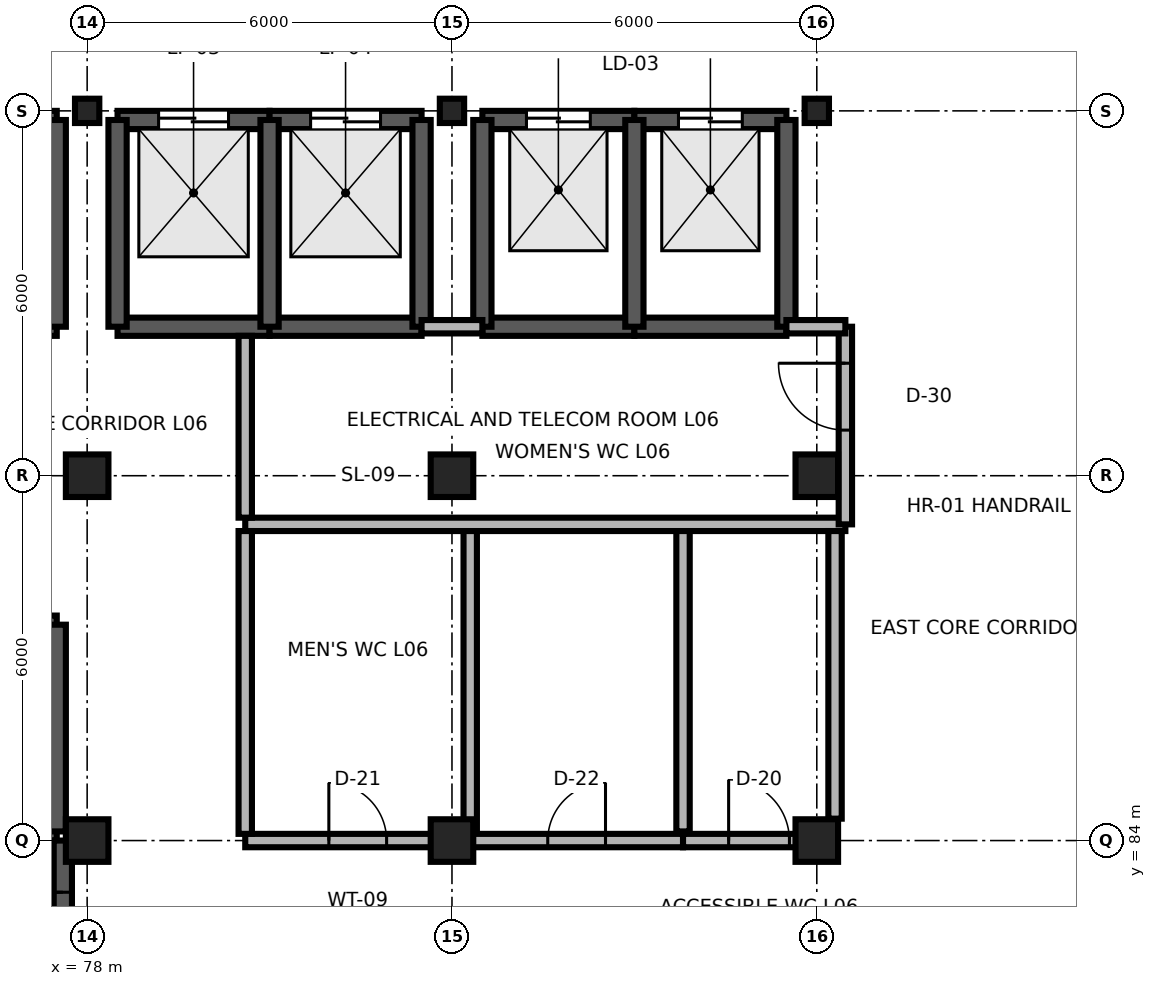
"""IFC4 building model, lengths in metres.
Left out: names, types, materials, properties, quantities, classifications, styles, units other than length and angle.
Written with IfcOpenShell. Run it as: python <this file> out.ifc"""

import sys

from ifc_helpers import new_model, si_unit, direction, frame, frame_2d, origin, origin_2d, place, context, subcontext, project, spatial, rectangle, i_section, extrude, element, fill, save


model = new_model("IFC4")
c1 = context("Model", 3, precision=1e-05, world=origin(), true_north=direction((0.0, 1.0)))
c2 = subcontext(c1, "Body", "Model", "MODEL_VIEW")
j1 = project(units=[si_unit("LENGTHUNIT", "METRE"), si_unit("PLANEANGLEUNIT", "RADIAN")], contexts=[c1])
p1 = place(None, origin())
s1 = spatial("IfcSite", under=j1, at=p1, CompositionType="ELEMENT")
p2 = place(p1, origin())
s2 = spatial("IfcBuilding", under=s1, at=p2, CompositionType="ELEMENT")
p3 = place(p2, frame((0.0, 0.0, 24.9)))
s3 = spatial("IfcBuildingStorey", under=s2, at=p3, CompositionType="ELEMENT", Elevation=24.9)
for number, where, z_axis, x_axis in (
    (1, (78.0, 84.0, 0.0), (0.0, 0.0, 1.0), (1.0, 0.0, 0.0)),
    (2, (84.0, 84.0, 0.0), (0.0, 0.0, 1.0), (1.0, 0.0, 0.0)),
    (3, (90.0, 84.0, 0.0), (0.0, 0.0, 1.0), (1.0, 0.0, 0.0)),
    (4, (78.0, 90.0, 0.0), (0.0, 0.0, 1.0), (1.0, 0.0, 0.0)),
    (5, (84.0, 90.0, 0.0), (0.0, 0.0, 1.0), (1.0, 0.0, 0.0)),
    (6, (90.0, 90.0, 0.0), (0.0, 0.0, 1.0), (1.0, 0.0, 0.0)),
):
    element("IfcColumn", number, at=place(p3, frame(where, z_axis=z_axis, x_axis=x_axis)), inside=s3, PredefinedType="COLUMN", context=c2, shape_type="SweptSolid", body=[
        extrude(rectangle(XDim=0.7, YDim=0.7, at=origin_2d()), origin(), (0.0, 0.0, 1.0), 3.9),
    ])
for number, where, z_axis, x_axis in (
    (7, (78.0, 96.0, 0.0), (0.0, 0.0, 1.0), (1.0, 0.0, 0.0)),
    (8, (84.0, 96.0, 0.0), (0.0, 0.0, 1.0), (1.0, 0.0, 0.0)),
    (9, (90.0, 96.0, 0.0), (0.0, 0.0, 1.0), (1.0, 0.0, 0.0)),
):
    element("IfcColumn", number, at=place(p3, frame(where, z_axis=z_axis, x_axis=x_axis)), inside=s3, PredefinedType="COLUMN", context=c2, shape_type="SweptSolid", body=[
        extrude(i_section(OverallWidth=0.4, OverallDepth=0.4, WebThickness=0.013, FlangeThickness=0.021, FilletRadius=0.022, at=origin_2d()), origin(), (0.0, 0.0, 1.0), 3.9),
    ])
p4 = place(p3, frame((75.0, 84.15, 0.0), z_axis=(0.0, 0.0, 1.0), x_axis=(1.0, 0.0, 0.0)))
e10 = element("IfcWall", 10, at=p4, inside=s3, PredefinedType="SHEAR", context=c2, shape_type="SweptSolid", body=[
    extrude(rectangle(XDim=2.5, YDim=0.3, at=frame_2d((1.25, 0.0))), origin(), (0.0, 0.0, 1.0), 3.74),
])
p5 = place(p4, frame((0.7, 0.0, 0.0)))
e11 = element("IfcOpeningElement", 11, at=p5, cuts=e10, PredefinedType="OPENING", context=c2, shape_type="SweptSolid", body=[
    extrude(rectangle(XDim=1.1, YDim=2.1, at=frame_2d((0.55, 1.05))), frame((0.0, 0.165, 0.0), z_axis=(0.0, -1.0, 0.0), x_axis=(1.0, 0.0, 0.0)), (0.0, 0.0, 1.0), 0.33),
])
p6 = place(p3, frame((75.0, 87.55, 0.0), z_axis=(0.0, 0.0, 1.0), x_axis=(1.0, 0.0, 0.0)))
e12 = element("IfcWall", 12, at=p6, inside=s3, PredefinedType="SHEAR", context=c2, shape_type="SweptSolid", body=[
    extrude(rectangle(XDim=2.5, YDim=0.3, at=frame_2d((1.25, 0.0))), origin(), (0.0, 0.0, 1.0), 3.74),
])
p7 = place(p3, frame((77.5, 84.15, 0.0), z_axis=(0.0, 0.0, 1.0), x_axis=(0.0, 1.0, 0.0)))
e13 = element("IfcWall", 13, at=p7, inside=s3, PredefinedType="SHEAR", context=c2, shape_type="SweptSolid", body=[
    extrude(rectangle(XDim=3.4, YDim=0.3, at=frame_2d((1.7, 0.0))), origin(), (0.0, 0.0, 1.0), 3.74),
])
p8 = place(p3, frame((75.0, 95.85, 0.0), z_axis=(0.0, 0.0, 1.0), x_axis=(1.0, 0.0, 0.0)))
e14 = element("IfcWall", 14, at=p8, inside=s3, PredefinedType="SHEAR", context=c2, shape_type="SweptSolid", body=[
    extrude(rectangle(XDim=2.5, YDim=0.3, at=frame_2d((1.25, 0.0))), origin(), (0.0, 0.0, 1.0), 3.74),
])
p9 = place(p8, frame((0.675, 0.0, 0.0)))
e15 = element("IfcOpeningElement", 15, at=p9, cuts=e14, PredefinedType="OPENING", context=c2, shape_type="SweptSolid", body=[
    extrude(rectangle(XDim=1.15, YDim=2.15, at=frame_2d((0.575, 1.075))), frame((0.0, 0.165, 0.0), z_axis=(0.0, -1.0, 0.0), x_axis=(1.0, 0.0, 0.0)), (0.0, 0.0, 1.0), 0.33),
])
p10 = place(p3, frame((75.0, 92.45, 0.0), z_axis=(0.0, 0.0, 1.0), x_axis=(1.0, 0.0, 0.0)))
e16 = element("IfcWall", 16, at=p10, inside=s3, PredefinedType="SHEAR", context=c2, shape_type="SweptSolid", body=[
    extrude(rectangle(XDim=2.5, YDim=0.3, at=frame_2d((1.25, 0.0))), origin(), (0.0, 0.0, 1.0), 3.74),
])
p11 = place(p3, frame((77.5, 92.45, 0.0), z_axis=(0.0, 0.0, 1.0), x_axis=(0.0, 1.0, 0.0)))
e17 = element("IfcWall", 17, at=p11, inside=s3, PredefinedType="SHEAR", context=c2, shape_type="SweptSolid", body=[
    extrude(rectangle(XDim=3.4, YDim=0.3, at=frame_2d((1.7, 0.0))), origin(), (0.0, 0.0, 1.0), 3.74),
])
p12 = place(p3, frame((78.5, 95.85, 0.0), z_axis=(0.0, 0.0, 1.0), x_axis=(1.0, 0.0, 0.0)))
e18 = element("IfcWall", 18, at=p12, inside=s3, PredefinedType="SHEAR", context=c2, shape_type="SweptSolid", body=[
    extrude(rectangle(XDim=2.5, YDim=0.3, at=frame_2d((1.25, 0.0))), origin(), (0.0, 0.0, 1.0), 3.74),
])
p13 = place(p12, frame((0.675, 0.0, 0.0)))
e19 = element("IfcOpeningElement", 19, at=p13, cuts=e18, PredefinedType="OPENING", context=c2, shape_type="SweptSolid", body=[
    extrude(rectangle(XDim=1.15, YDim=2.15, at=frame_2d((0.575, 1.075))), frame((0.0, 0.165, 0.0), z_axis=(0.0, -1.0, 0.0), x_axis=(1.0, 0.0, 0.0)), (0.0, 0.0, 1.0), 0.33),
])
p14 = place(p3, frame((78.5, 92.45, 0.0), z_axis=(0.0, 0.0, 1.0), x_axis=(1.0, 0.0, 0.0)))
e20 = element("IfcWall", 20, at=p14, inside=s3, PredefinedType="SHEAR", context=c2, shape_type="SweptSolid", body=[
    extrude(rectangle(XDim=2.5, YDim=0.3, at=frame_2d((1.25, 0.0))), origin(), (0.0, 0.0, 1.0), 3.74),
])
p15 = place(p3, frame((78.5, 92.45, 0.0), z_axis=(0.0, 0.0, 1.0), x_axis=(0.0, 1.0, 0.0)))
e21 = element("IfcWall", 21, at=p15, inside=s3, PredefinedType="SHEAR", context=c2, shape_type="SweptSolid", body=[
    extrude(rectangle(XDim=3.4, YDim=0.3, at=frame_2d((1.7, 0.0))), origin(), (0.0, 0.0, 1.0), 3.74),
])
p16 = place(p3, frame((81.0, 95.85, 0.0), z_axis=(0.0, 0.0, 1.0), x_axis=(1.0, 0.0, 0.0)))
e22 = element("IfcWall", 22, at=p16, inside=s3, PredefinedType="SHEAR", context=c2, shape_type="SweptSolid", body=[
    extrude(rectangle(XDim=2.5, YDim=0.3, at=frame_2d((1.25, 0.0))), origin(), (0.0, 0.0, 1.0), 3.74),
])
p17 = place(p16, frame((0.675, 0.0, 0.0)))
e23 = element("IfcOpeningElement", 23, at=p17, cuts=e22, PredefinedType="OPENING", context=c2, shape_type="SweptSolid", body=[
    extrude(rectangle(XDim=1.15, YDim=2.15, at=frame_2d((0.575, 1.075))), frame((0.0, 0.165, 0.0), z_axis=(0.0, -1.0, 0.0), x_axis=(1.0, 0.0, 0.0)), (0.0, 0.0, 1.0), 0.33),
])
p18 = place(p3, frame((81.0, 92.45, 0.0), z_axis=(0.0, 0.0, 1.0), x_axis=(1.0, 0.0, 0.0)))
e24 = element("IfcWall", 24, at=p18, inside=s3, PredefinedType="SHEAR", context=c2, shape_type="SweptSolid", body=[
    extrude(rectangle(XDim=2.5, YDim=0.3, at=frame_2d((1.25, 0.0))), origin(), (0.0, 0.0, 1.0), 3.74),
])
for number, where, z_axis, x_axis in (
    (25, (81.0, 92.45, 0.0), (0.0, 0.0, 1.0), (0.0, 1.0, 0.0)),
    (26, (83.5, 92.45, 0.0), (0.0, 0.0, 1.0), (0.0, 1.0, 0.0)),
):
    element("IfcWall", number, at=place(p3, frame(where, z_axis=z_axis, x_axis=x_axis)), inside=s3, PredefinedType="SHEAR", context=c2, shape_type="SweptSolid", body=[
        extrude(rectangle(XDim=3.4, YDim=0.3, at=frame_2d((1.7, 0.0))), origin(), (0.0, 0.0, 1.0), 3.74),
    ])
p19 = place(p3, frame((84.5, 95.85, 0.0), z_axis=(0.0, 0.0, 1.0), x_axis=(1.0, 0.0, 0.0)))
e27 = element("IfcWall", 27, at=p19, inside=s3, PredefinedType="SHEAR", context=c2, shape_type="SweptSolid", body=[
    extrude(rectangle(XDim=2.5, YDim=0.3, at=frame_2d((1.25, 0.0))), origin(), (0.0, 0.0, 1.0), 3.74),
])
p20 = place(p19, frame((0.725, 0.0, 0.0)))
e28 = element("IfcOpeningElement", 28, at=p20, cuts=e27, PredefinedType="OPENING", context=c2, shape_type="SweptSolid", body=[
    extrude(rectangle(XDim=1.05, YDim=2.1, at=frame_2d((0.525, 1.05))), frame((0.0, 0.165, 0.0), z_axis=(0.0, -1.0, 0.0), x_axis=(1.0, 0.0, 0.0)), (0.0, 0.0, 1.0), 0.33),
])
p21 = place(p3, frame((84.5, 92.45, 0.0), z_axis=(0.0, 0.0, 1.0), x_axis=(1.0, 0.0, 0.0)))
e29 = element("IfcWall", 29, at=p21, inside=s3, PredefinedType="SHEAR", context=c2, shape_type="SweptSolid", body=[
    extrude(rectangle(XDim=2.5, YDim=0.3, at=frame_2d((1.25, 0.0))), origin(), (0.0, 0.0, 1.0), 3.74),
])
p22 = place(p3, frame((84.5, 92.45, 0.0), z_axis=(0.0, 0.0, 1.0), x_axis=(0.0, 1.0, 0.0)))
e30 = element("IfcWall", 30, at=p22, inside=s3, PredefinedType="SHEAR", context=c2, shape_type="SweptSolid", body=[
    extrude(rectangle(XDim=3.4, YDim=0.3, at=frame_2d((1.7, 0.0))), origin(), (0.0, 0.0, 1.0), 3.74),
])
p23 = place(p3, frame((87.0, 95.85, 0.0), z_axis=(0.0, 0.0, 1.0), x_axis=(1.0, 0.0, 0.0)))
e31 = element("IfcWall", 31, at=p23, inside=s3, PredefinedType="SHEAR", context=c2, shape_type="SweptSolid", body=[
    extrude(rectangle(XDim=2.5, YDim=0.3, at=frame_2d((1.25, 0.0))), origin(), (0.0, 0.0, 1.0), 3.74),
])
p24 = place(p23, frame((0.725, 0.0, 0.0)))
e32 = element("IfcOpeningElement", 32, at=p24, cuts=e31, PredefinedType="OPENING", context=c2, shape_type="SweptSolid", body=[
    extrude(rectangle(XDim=1.05, YDim=2.1, at=frame_2d((0.525, 1.05))), frame((0.0, 0.165, 0.0), z_axis=(0.0, -1.0, 0.0), x_axis=(1.0, 0.0, 0.0)), (0.0, 0.0, 1.0), 0.33),
])
p25 = place(p3, frame((87.0, 92.45, 0.0), z_axis=(0.0, 0.0, 1.0), x_axis=(1.0, 0.0, 0.0)))
e33 = element("IfcWall", 33, at=p25, inside=s3, PredefinedType="SHEAR", context=c2, shape_type="SweptSolid", body=[
    extrude(rectangle(XDim=2.5, YDim=0.3, at=frame_2d((1.25, 0.0))), origin(), (0.0, 0.0, 1.0), 3.74),
])
for number, where, z_axis, x_axis in (
    (34, (87.0, 92.45, 0.0), (0.0, 0.0, 1.0), (0.0, 1.0, 0.0)),
    (35, (89.5, 92.45, 0.0), (0.0, 0.0, 1.0), (0.0, 1.0, 0.0)),
):
    element("IfcWall", number, at=place(p3, frame(where, z_axis=z_axis, x_axis=x_axis)), inside=s3, PredefinedType="SHEAR", context=c2, shape_type="SweptSolid", body=[
        extrude(rectangle(XDim=3.4, YDim=0.3, at=frame_2d((1.7, 0.0))), origin(), (0.0, 0.0, 1.0), 3.74),
    ])
p26 = place(p3, frame((77.6, 81.0, 0.0), z_axis=(0.0, 0.0, 1.0), x_axis=(0.0, 1.0, 0.0)))
e36 = element("IfcWall", 36, at=p26, inside=s3, PredefinedType="SHEAR", context=c2, shape_type="SweptSolid", body=[
    extrude(rectangle(XDim=3.0, YDim=0.3, at=frame_2d((1.5, 0.0))), origin(), (0.0, 0.0, 1.0), 3.74),
])
p27 = place(p26, frame((0.85, 0.0, 0.0)))
e37 = element("IfcOpeningElement", 37, at=p27, cuts=e36, PredefinedType="OPENING", context=c2, shape_type="SweptSolid", body=[
    extrude(rectangle(XDim=1.3, YDim=2.2, at=frame_2d((0.65, 1.1))), frame((0.0, 0.165, 0.0), z_axis=(0.0, -1.0, 0.0), x_axis=(1.0, 0.0, 0.0)), (0.0, 0.0, 1.0), 0.33),
])
p28 = place(p3, frame((80.6, 84.0, 0.0), z_axis=(0.0, 0.0, 1.0), x_axis=(1.0, 0.0, 0.0)))
e38 = element("IfcWall", 38, at=p28, inside=s3, PredefinedType="PARTITIONING", context=c2, shape_type="SweptSolid", body=[
    extrude(rectangle(XDim=3.7, YDim=0.22, at=frame_2d((1.85, 0.0))), origin(), (0.0, 0.0, 1.0), 3.352),
])
p29 = place(p28, frame((1.375, 0.0, 0.0)))
e39 = element("IfcOpeningElement", 39, at=p29, cuts=e38, PredefinedType="OPENING", context=c2, shape_type="SweptSolid", body=[
    extrude(rectangle(XDim=0.95, YDim=2.15, at=frame_2d((0.475, 1.075))), frame((0.0, 0.125, 0.0), z_axis=(0.0, -1.0, 0.0), x_axis=(1.0, 0.0, 0.0)), (0.0, 0.0, 1.0), 0.25),
])
p30 = place(p3, frame((84.3, 84.0, 0.0), z_axis=(0.0, 0.0, 1.0), x_axis=(1.0, 0.0, 0.0)))
e40 = element("IfcWall", 40, at=p30, inside=s3, PredefinedType="PARTITIONING", context=c2, shape_type="SweptSolid", body=[
    extrude(rectangle(XDim=3.5, YDim=0.22, at=frame_2d((1.75, 0.0))), origin(), (0.0, 0.0, 1.0), 3.352),
])
p31 = place(p30, frame((1.275, 0.0, 0.0)))
e41 = element("IfcOpeningElement", 41, at=p31, cuts=e40, PredefinedType="OPENING", context=c2, shape_type="SweptSolid", body=[
    extrude(rectangle(XDim=0.95, YDim=2.1, at=frame_2d((0.475, 1.05))), frame((0.0, 0.125, 0.0), z_axis=(0.0, -1.0, 0.0), x_axis=(1.0, 0.0, 0.0)), (0.0, 0.0, 1.0), 0.25),
])
p32 = place(p3, frame((87.8, 84.0, 0.0), z_axis=(0.0, 0.0, 1.0), x_axis=(1.0, 0.0, 0.0)))
e42 = element("IfcWall", 42, at=p32, inside=s3, PredefinedType="PARTITIONING", context=c2, shape_type="SweptSolid", body=[
    extrude(rectangle(XDim=2.5, YDim=0.22, at=frame_2d((1.25, 0.0))), origin(), (0.0, 0.0, 1.0), 3.352),
])
p33 = place(p32, frame((0.75, 0.0, 0.0)))
e43 = element("IfcOpeningElement", 43, at=p33, cuts=e42, PredefinedType="OPENING", context=c2, shape_type="SweptSolid", body=[
    extrude(rectangle(XDim=1.0, YDim=2.15, at=frame_2d((0.5, 1.075))), frame((0.0, 0.125, 0.0), z_axis=(0.0, -1.0, 0.0), x_axis=(1.0, 0.0, 0.0)), (0.0, 0.0, 1.0), 0.25),
])
for number, where, z_axis, x_axis in (
    (44, (84.3, 84.15, 0.0), (0.0, 0.0, 1.0), (0.0, 1.0, 0.0)),
    (45, (87.8, 84.15, 0.0), (0.0, 0.0, 1.0), (0.0, 1.0, 0.0)),
):
    element("IfcWall", number, at=place(p3, frame(where, z_axis=z_axis, x_axis=x_axis)), inside=s3, PredefinedType="PARTITIONING", context=c2, shape_type="SweptSolid", body=[
        extrude(rectangle(XDim=5.0, YDim=0.22, at=frame_2d((2.5, 0.0))), origin(), (0.0, 0.0, 1.0), 3.74),
    ])
p34 = place(p3, frame((80.6, 89.2, 0.0), z_axis=(0.0, 0.0, 1.0), x_axis=(1.0, 0.0, 0.0)))
e46 = element("IfcWall", 46, at=p34, inside=s3, PredefinedType="PARTITIONING", context=c2, shape_type="SweptSolid", body=[
    extrude(rectangle(XDim=9.87, YDim=0.22, at=frame_2d((4.935, 0.0))), origin(), (0.0, 0.0, 1.0), 3.74),
])
p35 = place(p3, frame((90.47, 89.2, 0.0), z_axis=(0.0, 0.0, 1.0), x_axis=(0.0, 1.0, 0.0)))
e47 = element("IfcWall", 47, at=p35, inside=s3, PredefinedType="PARTITIONING", context=c2, shape_type="SweptSolid", body=[
    extrude(rectangle(XDim=3.25, YDim=0.22, at=frame_2d((1.625, 0.0))), origin(), (0.0, 0.0, 1.0), 3.74),
])
p36 = place(p35, frame((1.55, 0.0, 0.0)))
e48 = element("IfcOpeningElement", 48, at=p36, cuts=e47, PredefinedType="OPENING", context=c2, shape_type="SweptSolid", body=[
    extrude(rectangle(XDim=1.1, YDim=2.15, at=frame_2d((0.55, 1.075))), frame((0.0, 0.125, 0.0), z_axis=(0.0, -1.0, 0.0), x_axis=(1.0, 0.0, 0.0)), (0.0, 0.0, 1.0), 0.25),
])
p37 = place(p3, frame((80.6, 84.11, 0.0), z_axis=(0.0, 0.0, 1.0), x_axis=(0.0, 1.0, 0.0)))
e49 = element("IfcWall", 49, at=p37, inside=s3, PredefinedType="PARTITIONING", context=c2, shape_type="SweptSolid", body=[
    extrude(rectangle(XDim=4.98, YDim=0.22, at=frame_2d((2.49, 0.0))), origin(), (0.0, 0.0, 1.0), 3.74),
])
p38 = place(p3, frame((90.3, 84.36, 0.0), z_axis=(0.0, 0.0, 1.0), x_axis=(0.0, 1.0, 0.0)))
e50 = element("IfcWall", 50, at=p38, inside=s3, PredefinedType="PARTITIONING", context=c2, shape_type="SweptSolid", body=[
    extrude(rectangle(XDim=4.73, YDim=0.22, at=frame_2d((2.365, 0.0))), origin(), (0.0, 0.0, 1.0), 3.74),
])
p39 = place(p3, frame((80.6, 89.31, 0.0), z_axis=(0.0, 0.0, 1.0), x_axis=(0.0, 1.0, 0.0)))
e51 = element("IfcWall", 51, at=p39, inside=s3, PredefinedType="PARTITIONING", context=c2, shape_type="SweptSolid", body=[
    extrude(rectangle(XDim=2.99, YDim=0.22, at=frame_2d((1.495, 0.0))), origin(), (0.0, 0.0, 1.0), 3.74),
])
p40 = place(p3, frame((83.5, 92.45, 0.0), z_axis=(0.0, 0.0, 1.0), x_axis=(1.0, 0.0, 0.0)))
e52 = element("IfcWall", 52, at=p40, inside=s3, PredefinedType="PARTITIONING", context=c2, shape_type="SweptSolid", body=[
    extrude(rectangle(XDim=1.0, YDim=0.22, at=frame_2d((0.5, 0.0))), origin(), (0.0, 0.0, 1.0), 3.74),
])
p41 = place(p3, frame((89.5, 92.45, 0.0), z_axis=(0.0, 0.0, 1.0), x_axis=(1.0, 0.0, 0.0)))
e53 = element("IfcWall", 53, at=p41, inside=s3, PredefinedType="PARTITIONING", context=c2, shape_type="SweptSolid", body=[
    extrude(rectangle(XDim=0.97, YDim=0.22, at=frame_2d((0.485, 0.0))), origin(), (0.0, 0.0, 1.0), 3.74),
])
p42 = place(p13, origin())
e54 = element("IfcDoor", 54, at=p42, inside=s3, OperationType="DOUBLE_DOOR_SLIDING", PredefinedType="DOOR", context=c2, shape_type="SweptSolid", body=[
    extrude(rectangle(XDim=1.15, YDim=2.15, at=frame_2d((0.575, 1.075))), frame((0.0, 0.025, 0.0), z_axis=(0.0, -1.0, 0.0), x_axis=(1.0, 0.0, 0.0)), (0.0, 0.0, 1.0), 0.05),
])
fill(e19, e54)
p43 = place(p17, origin())
e55 = element("IfcDoor", 55, at=p43, inside=s3, OperationType="DOUBLE_DOOR_SLIDING", PredefinedType="DOOR", context=c2, shape_type="SweptSolid", body=[
    extrude(rectangle(XDim=1.15, YDim=2.15, at=frame_2d((0.575, 1.075))), frame((0.0, 0.025, 0.0), z_axis=(0.0, -1.0, 0.0), x_axis=(1.0, 0.0, 0.0)), (0.0, 0.0, 1.0), 0.05),
])
fill(e23, e55)
p44 = place(p20, origin())
e56 = element("IfcDoor", 56, at=p44, inside=s3, OperationType="DOUBLE_DOOR_SLIDING", PredefinedType="DOOR", context=c2, shape_type="SweptSolid", body=[
    extrude(rectangle(XDim=1.05, YDim=2.1, at=frame_2d((0.525, 1.05))), frame((0.0, 0.025, 0.0), z_axis=(0.0, -1.0, 0.0), x_axis=(1.0, 0.0, 0.0)), (0.0, 0.0, 1.0), 0.05),
])
fill(e28, e56)
p45 = place(p24, origin())
e57 = element("IfcDoor", 57, at=p45, inside=s3, OperationType="DOUBLE_DOOR_SLIDING", PredefinedType="DOOR", context=c2, shape_type="SweptSolid", body=[
    extrude(rectangle(XDim=1.05, YDim=2.1, at=frame_2d((0.525, 1.05))), frame((0.0, 0.025, 0.0), z_axis=(0.0, -1.0, 0.0), x_axis=(1.0, 0.0, 0.0)), (0.0, 0.0, 1.0), 0.05),
])
fill(e32, e57)
p46 = place(p27, origin())
e58 = element("IfcDoor", 58, at=p46, inside=s3, OperationType="SINGLE_SWING_RIGHT", PredefinedType="DOOR", context=c2, shape_type="SweptSolid", body=[
    extrude(rectangle(XDim=1.3, YDim=2.2, at=frame_2d((0.65, 1.1))), frame((0.0, 0.025, 0.0), z_axis=(0.0, -1.0, 0.0), x_axis=(1.0, 0.0, 0.0)), (0.0, 0.0, 1.0), 0.05),
])
fill(e37, e58)
p47 = place(p29, origin())
e59 = element("IfcDoor", 59, at=p47, inside=s3, OperationType="SINGLE_SWING_LEFT", PredefinedType="DOOR", context=c2, shape_type="SweptSolid", body=[
    extrude(rectangle(XDim=0.95, YDim=2.15, at=frame_2d((0.475, 1.075))), frame((0.0, 0.025, 0.0), z_axis=(0.0, -1.0, 0.0), x_axis=(1.0, 0.0, 0.0)), (0.0, 0.0, 1.0), 0.05),
])
fill(e39, e59)
p48 = place(p31, origin())
e60 = element("IfcDoor", 60, at=p48, inside=s3, OperationType="SINGLE_SWING_RIGHT", PredefinedType="DOOR", context=c2, shape_type="SweptSolid", body=[
    extrude(rectangle(XDim=0.95, YDim=2.1, at=frame_2d((0.475, 1.05))), frame((0.0, 0.025, 0.0), z_axis=(0.0, -1.0, 0.0), x_axis=(1.0, 0.0, 0.0)), (0.0, 0.0, 1.0), 0.05),
])
fill(e41, e60)
p49 = place(p33, origin())
e61 = element("IfcDoor", 61, at=p49, inside=s3, OperationType="SINGLE_SWING_LEFT", PredefinedType="DOOR", context=c2, shape_type="SweptSolid", body=[
    extrude(rectangle(XDim=1.0, YDim=2.15, at=frame_2d((0.5, 1.075))), frame((0.0, 0.025, 0.0), z_axis=(0.0, -1.0, 0.0), x_axis=(1.0, 0.0, 0.0)), (0.0, 0.0, 1.0), 0.05),
])
fill(e43, e61)
p50 = place(p36, origin())
e62 = element("IfcDoor", 62, at=p50, inside=s3, OperationType="SINGLE_SWING_RIGHT", PredefinedType="DOOR", context=c2, shape_type="SweptSolid", body=[
    extrude(rectangle(XDim=1.1, YDim=2.15, at=frame_2d((0.55, 1.075))), frame((0.0, 0.025, 0.0), z_axis=(0.0, -1.0, 0.0), x_axis=(1.0, 0.0, 0.0)), (0.0, 0.0, 1.0), 0.05),
])
fill(e48, e62)
save(model, sys.argv[1])
